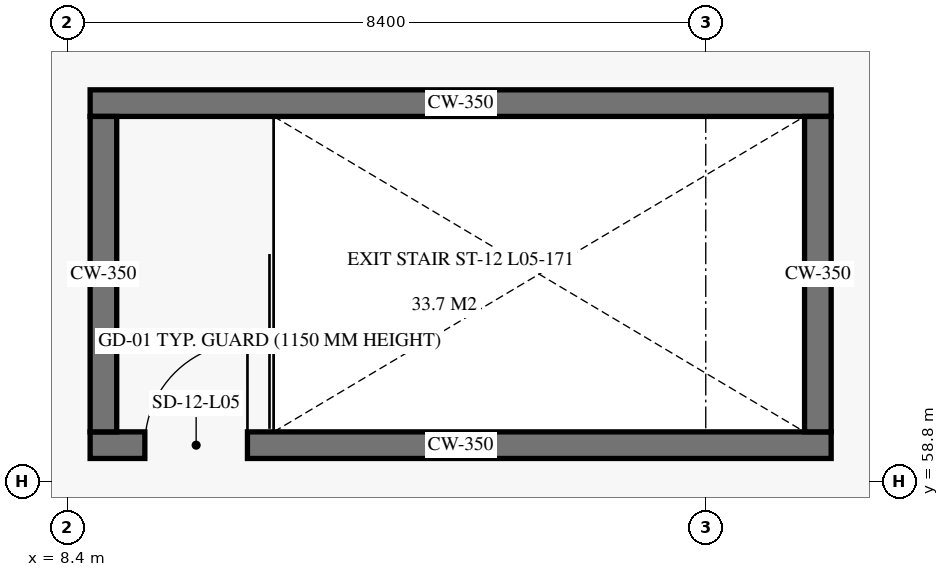
"""IFC4 building model, lengths in metres.
Left out: names, types, materials, properties, quantities, classifications, styles, units other than length and angle.
Written with IfcOpenShell. Run it as: python <this file> out.ifc"""

import sys

from ifc_helpers import new_model, si_unit, direction, frame, frame_2d, origin, place, context, subcontext, project, spatial, rectangle, extrude, element, fill, save


model = new_model("IFC4")
c1 = context("Model", 3, precision=1e-05, world=origin(), true_north=direction((0.0, 1.0)))
c2 = subcontext(c1, "Body", "Model", "MODEL_VIEW")
j1 = project(units=[si_unit("LENGTHUNIT", "METRE"), si_unit("PLANEANGLEUNIT", "RADIAN")], contexts=[c1])
p1 = place(None, origin())
s1 = spatial("IfcSite", under=j1, at=p1, CompositionType="ELEMENT")
p2 = place(p1, origin())
s2 = spatial("IfcBuilding", under=s1, at=p2, CompositionType="ELEMENT")
p3 = place(p2, frame((0.0, 0.0, 22.2)))
s3 = spatial("IfcBuildingStorey", under=s2, at=p3, CompositionType="ELEMENT", Elevation=22.2)
p4 = place(p3, frame((8.7, 59.275, 0.0), z_axis=(0.0, 0.0, 1.0), x_axis=(1.0, 0.0, 0.0)))
e1 = element("IfcWall", 1, at=p4, inside=s3, PredefinedType="SHEAR", context=c2, shape_type="SweptSolid", body=[
    extrude(rectangle(XDim=9.75, YDim=0.35, at=frame_2d((4.875, 0.0))), origin(), (0.0, 0.0, 1.0), 4.22),
])
p5 = place(p4, frame((0.72, 0.0, 0.0)))
e2 = element("IfcOpeningElement", 2, at=p5, cuts=e1, PredefinedType="OPENING", context=c2, shape_type="SweptSolid", body=[
    extrude(rectangle(XDim=1.35, YDim=2.25, at=frame_2d((0.675, 1.125))), frame((0.0, 0.185, 0.0), z_axis=(0.0, -1.0, 0.0), x_axis=(1.0, 0.0, 0.0)), (0.0, 0.0, 1.0), 0.37),
])
p6 = place(p3, frame((8.7, 63.775, 0.0), z_axis=(0.0, 0.0, 1.0), x_axis=(1.0, 0.0, 0.0)))
e3 = element("IfcWall", 3, at=p6, inside=s3, PredefinedType="SHEAR", context=c2, shape_type="SweptSolid", body=[
    extrude(rectangle(XDim=9.75, YDim=0.35, at=frame_2d((4.875, 0.0))), origin(), (0.0, 0.0, 1.0), 4.22),
])
for number, where, z_axis, x_axis in (
    (4, (8.875, 59.45, 0.0), (0.0, 0.0, 1.0), (0.0, 1.0, 0.0)),
    (5, (18.275, 59.45, 0.0), (0.0, 0.0, 1.0), (0.0, 1.0, 0.0)),
):
    element("IfcWall", number, at=place(p3, frame(where, z_axis=z_axis, x_axis=x_axis)), inside=s3, PredefinedType="SHEAR", context=c2, shape_type="SweptSolid", body=[
        extrude(rectangle(XDim=4.15, YDim=0.35, at=frame_2d((2.075, 0.0))), origin(), (0.0, 0.0, 1.0), 4.22),
    ])
p7 = place(p5, origin())
e6 = element("IfcDoor", 6, at=p7, inside=s3, OperationType="SINGLE_SWING_RIGHT", PredefinedType="DOOR", context=c2, shape_type="SweptSolid", body=[
    extrude(rectangle(XDim=1.35, YDim=2.25, at=frame_2d((0.675, 1.125))), frame((0.0, 0.025, 0.0), z_axis=(0.0, -1.0, 0.0), x_axis=(1.0, 0.0, 0.0)), (0.0, 0.0, 1.0), 0.05),
])
fill(e2, e6)
save(model, sys.argv[1])
